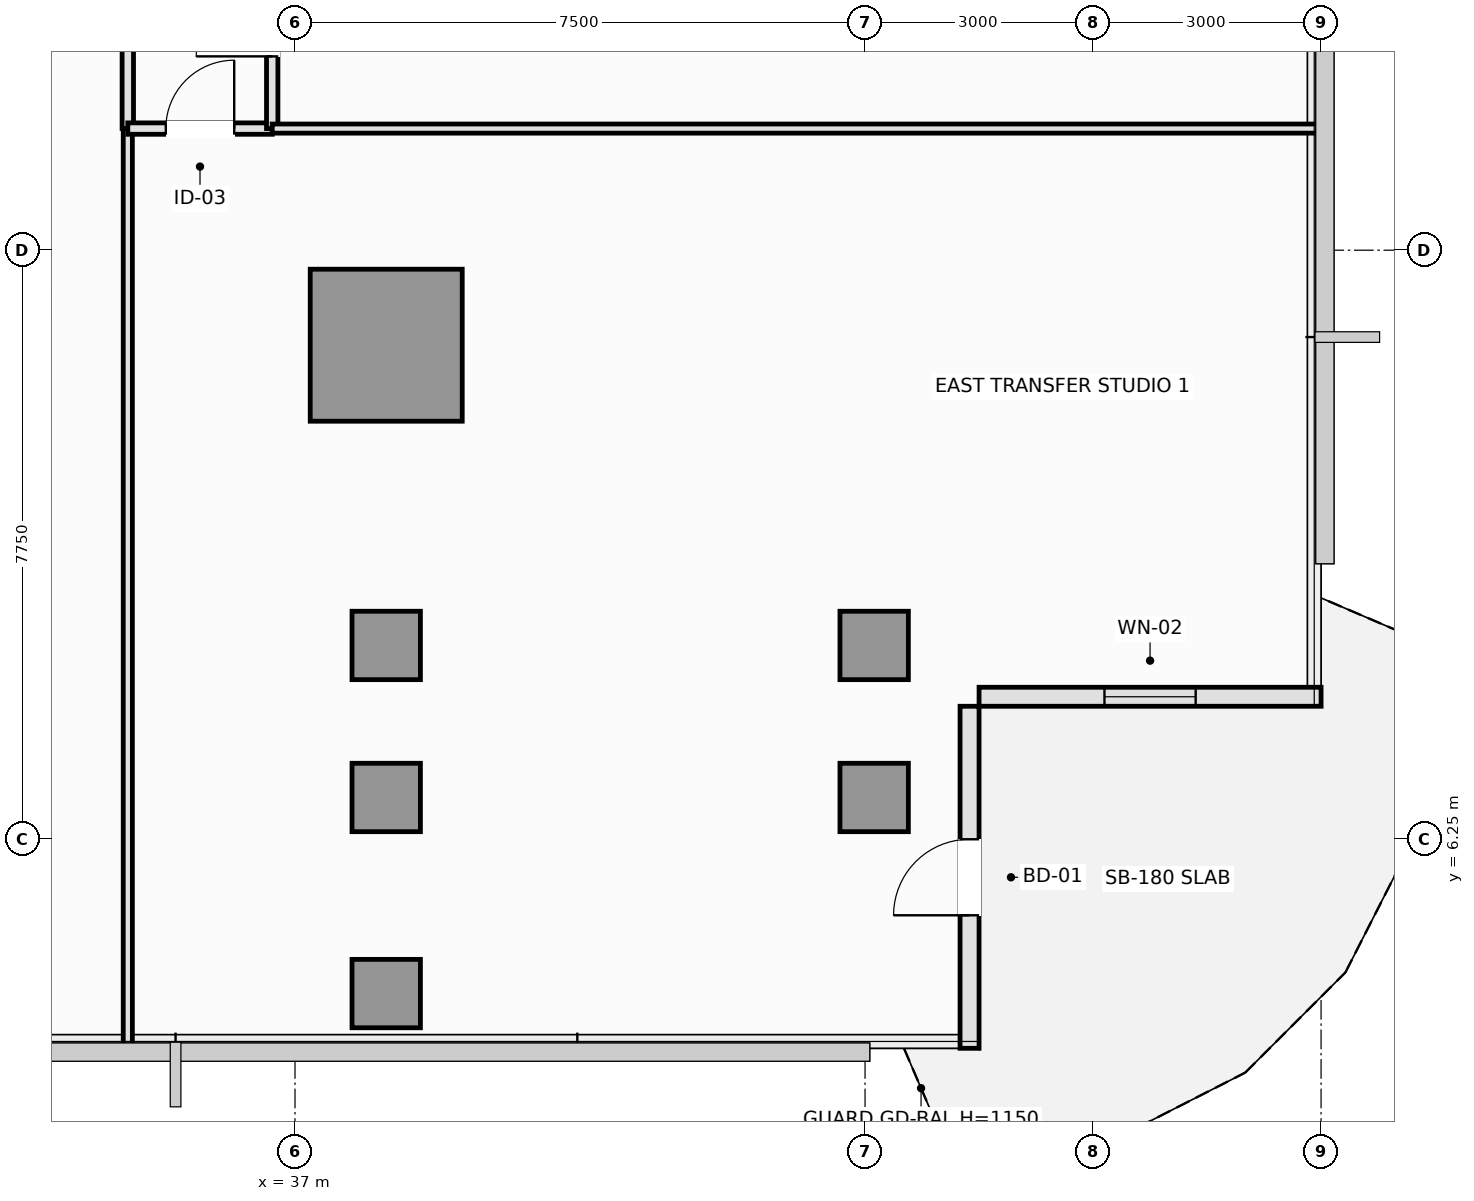
"""IFC4 building model, lengths in metres.
Left out: names, types, materials, properties, quantities, classifications, styles, units other than length and angle.
Written with IfcOpenShell. Run it as: python <this file> out.ifc"""

import sys

from ifc_helpers import new_model, si_unit, direction, frame, frame_2d, origin, origin_2d, place, context, subcontext, project, spatial, rectangle, extrude, element, fill, save


model = new_model("IFC4")
c1 = context("Model", 3, precision=1e-05, world=origin(), true_north=direction((0.0, 1.0)))
c2 = subcontext(c1, "Body", "Model", "MODEL_VIEW")
j1 = project(units=[si_unit("LENGTHUNIT", "METRE"), si_unit("PLANEANGLEUNIT", "RADIAN")], contexts=[c1])
p1 = place(None, origin())
s1 = spatial("IfcSite", under=j1, at=p1, CompositionType="ELEMENT")
p2 = place(p1, origin())
s2 = spatial("IfcBuilding", under=s1, at=p2, CompositionType="ELEMENT")
p3 = place(p2, frame((0.0, 0.0, 102.25)))
s3 = spatial("IfcBuildingStorey", under=s2, at=p3, CompositionType="ELEMENT", Elevation=102.25)
p4 = place(p3, frame((38.2, 12.75, 0.0), z_axis=(0.0, 0.0, 1.0), x_axis=(1.0, 0.0, 0.0)))
e1 = element("IfcColumn", 1, at=p4, inside=s3, PredefinedType="COLUMN", context=c2, shape_type="SweptSolid", body=[
    extrude(rectangle(XDim=2.0, YDim=2.0, at=origin_2d()), origin(), (0.0, 0.0, 1.0), 3.55),
])
for number, where, z_axis, x_axis in (
    (2, (38.2, 6.8, 0.0), (0.0, 0.0, 1.0), (1.0, 0.0, 0.0)),
    (3, (38.2, 8.8, 0.0), (0.0, 0.0, 1.0), (1.0, 0.0, 0.0)),
    (4, (44.62, 6.8, 0.0), (0.0, 0.0, 1.0), (1.0, 0.0, 0.0)),
    (5, (44.62, 8.8, 0.0), (0.0, 0.0, 1.0), (1.0, 0.0, 0.0)),
    (6, (38.2, 4.22, 0.0), (0.0, 0.0, 1.0), (1.0, 0.0, 0.0)),
):
    element("IfcColumn", number, at=place(p3, frame(where, z_axis=z_axis, x_axis=x_axis)), inside=s3, PredefinedType="COLUMN", context=c2, shape_type="SweptSolid", body=[
        extrude(rectangle(XDim=0.9, YDim=0.9, at=origin_2d()), origin(), (0.0, 0.0, 1.0), 3.55),
    ])
p5 = place(p3, frame((45.875, 3.5, 0.0), z_axis=(0.0, 0.0, 1.0), x_axis=(0.0, 1.0, 0.0)))
e7 = element("IfcWall", 7, at=p5, inside=s3, PredefinedType="SOLIDWALL", context=c2, shape_type="SweptSolid", body=[
    extrude(rectangle(XDim=4.5, YDim=0.25, at=frame_2d((2.25, 0.0))), origin(), (0.0, 0.0, 1.0), 3.07),
])
p6 = place(p5, frame((1.75, 0.0, 0.0)))
e8 = element("IfcOpeningElement", 8, at=p6, cuts=e7, PredefinedType="OPENING", context=c2, shape_type="SweptSolid", body=[
    extrude(rectangle(XDim=1.0, YDim=2.2, at=frame_2d((0.5, 1.1))), frame((0.0, 0.135, 0.0), z_axis=(0.0, -1.0, 0.0), x_axis=(1.0, 0.0, 0.0)), (0.0, 0.0, 1.0), 0.27),
])
p7 = place(p3, frame((46.0, 8.125, 0.0), z_axis=(0.0, 0.0, 1.0), x_axis=(1.0, 0.0, 0.0)))
e9 = element("IfcWall", 9, at=p7, inside=s3, PredefinedType="SOLIDWALL", context=c2, shape_type="SweptSolid", body=[
    extrude(rectangle(XDim=4.5, YDim=0.25, at=frame_2d((2.25, 0.0))), origin(), (0.0, 0.0, 1.0), 3.1),
])
p8 = place(p7, frame((1.65, 0.0, 0.9)))
e10 = element("IfcOpeningElement", 10, at=p8, cuts=e9, PredefinedType="OPENING", context=c2, shape_type="SweptSolid", body=[
    extrude(rectangle(XDim=1.2, YDim=1.8, at=frame_2d((0.6, 0.9))), frame((0.0, 0.135, 0.0), z_axis=(0.0, -1.0, 0.0), x_axis=(1.0, 0.0, 0.0)), (0.0, 0.0, 1.0), 0.27),
])
p9 = place(p3, frame((34.8, 15.6, 0.0), z_axis=(0.0, 0.0, 1.0), x_axis=(0.0, 1.0, 0.0)))
e11 = element("IfcWall", 11, at=p9, inside=s3, PredefinedType="PARTITIONING", context=c2, shape_type="SweptSolid", body=[
    extrude(rectangle(XDim=8.6, YDim=0.15, at=frame_2d((4.3, 0.0))), origin(), (0.0, 0.0, 1.0), 3.37),
])
p10 = place(p3, frame((34.8, 3.51, 0.0), z_axis=(0.0, 0.0, 1.0), x_axis=(0.0, 1.0, 0.0)))
e12 = element("IfcWall", 12, at=p10, inside=s3, PredefinedType="PARTITIONING", context=c2, shape_type="SweptSolid", body=[
    extrude(rectangle(XDim=12.09, YDim=0.12, at=frame_2d((6.045, 0.0))), origin(), (0.0, 0.0, 1.0), 3.37),
])
p11 = place(p3, frame((34.8, 15.6, 0.0), z_axis=(0.0, 0.0, 1.0), x_axis=(1.0, 0.0, 0.0)))
e13 = element("IfcWall", 13, at=p11, inside=s3, PredefinedType="PARTITIONING", context=c2, shape_type="SweptSolid", body=[
    extrude(rectangle(XDim=1.9, YDim=0.15, at=frame_2d((0.95, 0.0))), origin(), (0.0, 0.0, 1.0), 3.37),
])
p12 = place(p11, frame((0.5, 0.0, 0.0)))
e14 = element("IfcOpeningElement", 14, at=p12, cuts=e13, PredefinedType="OPENING", context=c2, shape_type="SweptSolid", body=[
    extrude(rectangle(XDim=0.9, YDim=2.1, at=frame_2d((0.45, 1.05))), frame((0.0, 0.085, 0.0), z_axis=(0.0, -1.0, 0.0), x_axis=(1.0, 0.0, 0.0)), (0.0, 0.0, 1.0), 0.17),
])
p13 = place(p3, frame((36.7, 15.6, 0.0), z_axis=(0.0, 0.0, 1.0), x_axis=(0.0, 1.0, 0.0)))
e15 = element("IfcWall", 15, at=p13, inside=s3, PredefinedType="PARTITIONING", context=c2, shape_type="SweptSolid", body=[
    extrude(rectangle(XDim=2.9, YDim=0.15, at=frame_2d((1.45, 0.0))), origin(), (0.0, 0.0, 1.0), 3.37),
])
p14 = place(p13, frame((0.95, 0.0, 0.0)))
e16 = element("IfcOpeningElement", 16, at=p14, cuts=e15, PredefinedType="OPENING", context=c2, shape_type="SweptSolid", body=[
    extrude(rectangle(XDim=1.0, YDim=2.15, at=frame_2d((0.5, 1.075))), frame((0.0, 0.085, 0.0), z_axis=(0.0, -1.0, 0.0), x_axis=(1.0, 0.0, 0.0)), (0.0, 0.0, 1.0), 0.17),
])
p15 = place(p3, frame((36.7, 15.6, 0.0), z_axis=(0.0, 0.0, 1.0), x_axis=(1.0, 0.0, 0.0)))
e17 = element("IfcWall", 17, at=p15, inside=s3, PredefinedType="PARTITIONING", context=c2, shape_type="SweptSolid", body=[
    extrude(rectangle(XDim=13.79, YDim=0.12, at=frame_2d((6.895, 0.0))), origin(), (0.0, 0.0, 1.0), 3.37),
])
p16 = place(p6, frame((1.0, 0.0, 0.0), z_axis=(0.0, 0.0, 1.0), x_axis=(-1.0, 0.0, 0.0)))
e18 = element("IfcDoor", 18, at=p16, inside=s3, OperationType="SINGLE_SWING_LEFT", PredefinedType="DOOR", context=c2, shape_type="SweptSolid", body=[
    extrude(rectangle(XDim=1.0, YDim=2.2, at=frame_2d((0.5, 1.1))), frame((0.0, 0.025, 0.0), z_axis=(0.0, -1.0, 0.0), x_axis=(1.0, 0.0, 0.0)), (0.0, 0.0, 1.0), 0.05),
])
fill(e8, e18)
p17 = place(p8, origin())
e19 = element("IfcWindow", 19, at=p17, inside=s3, PartitioningType="SINGLE_PANEL", PredefinedType="WINDOW", context=c2, shape_type="SweptSolid", body=[
    extrude(rectangle(XDim=1.2, YDim=1.8, at=frame_2d((0.6, 0.9))), frame((0.0, 0.03, 0.0), z_axis=(0.0, -1.0, 0.0), x_axis=(1.0, 0.0, 0.0)), (0.0, 0.0, 1.0), 0.06),
])
fill(e10, e19)
p18 = place(p12, origin())
e20 = element("IfcDoor", 20, at=p18, inside=s3, OperationType="SINGLE_SWING_RIGHT", PredefinedType="DOOR", context=c2, shape_type="SweptSolid", body=[
    extrude(rectangle(XDim=0.9, YDim=2.1, at=frame_2d((0.45, 1.05))), frame((0.0, 0.025, 0.0), z_axis=(0.0, -1.0, 0.0), x_axis=(1.0, 0.0, 0.0)), (0.0, 0.0, 1.0), 0.05),
])
fill(e14, e20)
p19 = place(p14, origin())
e21 = element("IfcDoor", 21, at=p19, inside=s3, OperationType="SINGLE_SWING_LEFT", PredefinedType="DOOR", context=c2, shape_type="SweptSolid", body=[
    extrude(rectangle(XDim=1.0, YDim=2.15, at=frame_2d((0.5, 1.075))), frame((0.0, 0.025, 0.0), z_axis=(0.0, -1.0, 0.0), x_axis=(1.0, 0.0, 0.0)), (0.0, 0.0, 1.0), 0.05),
])
fill(e16, e21)
save(model, sys.argv[1])
